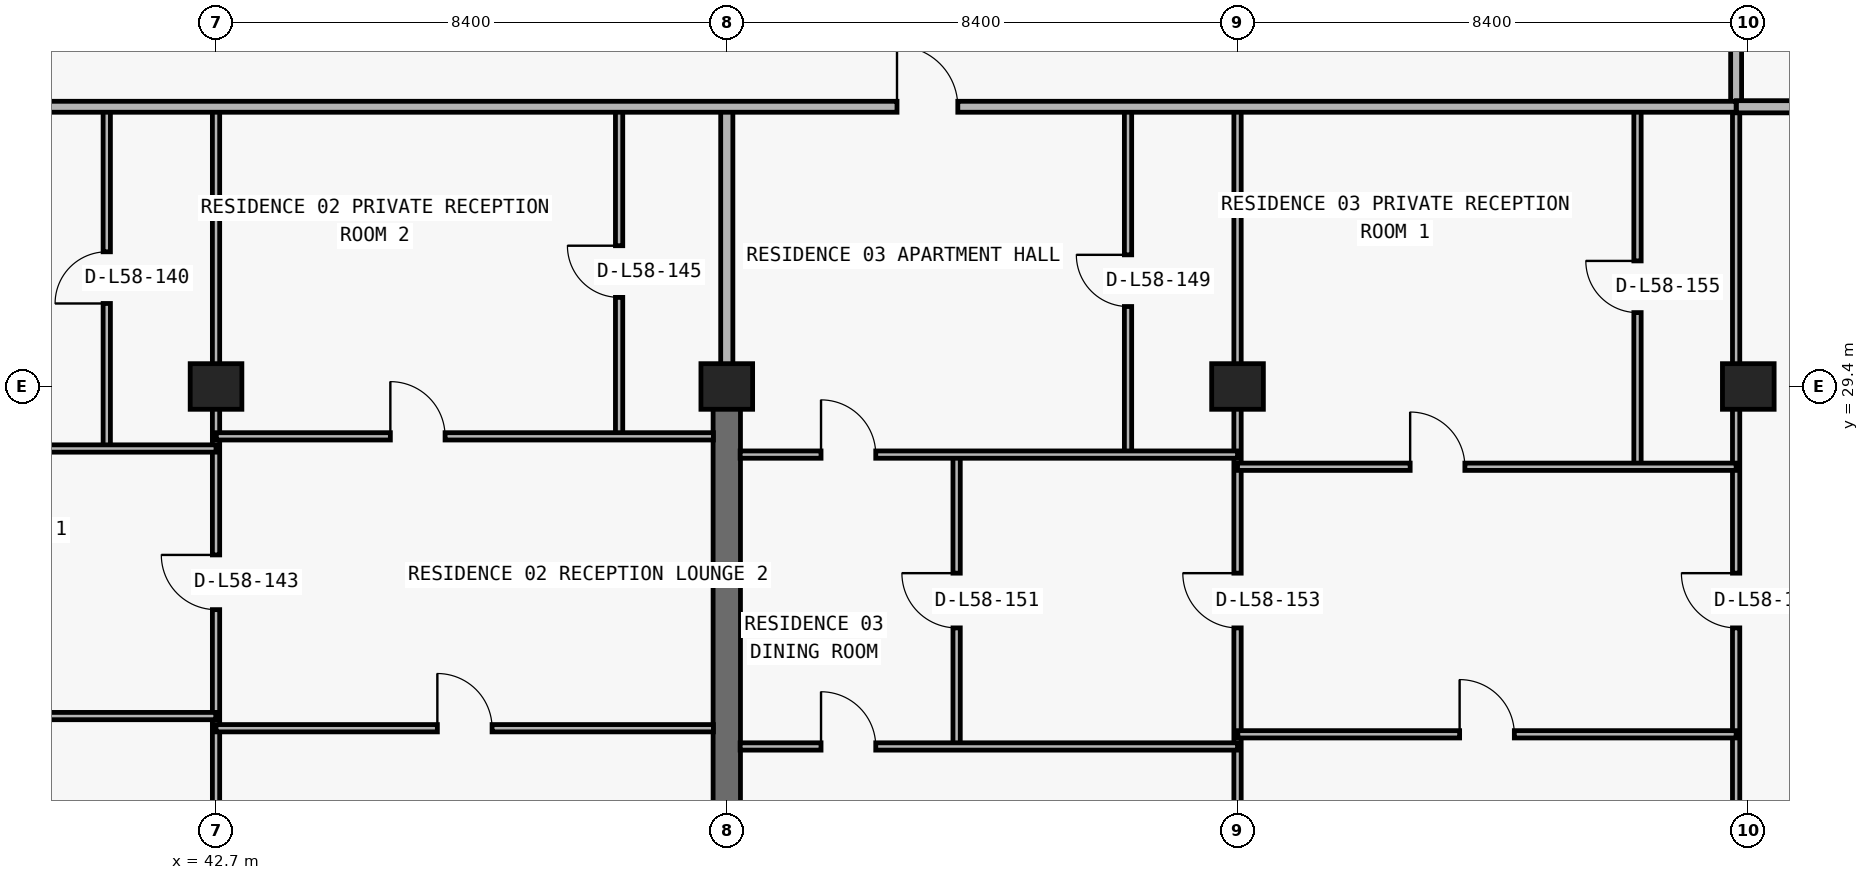
"""IFC4 building model, lengths in metres.
Left out: names, types, materials, properties, quantities, classifications, styles, units other than length and angle.
Written with IfcOpenShell. Run it as: python <this file> out.ifc"""

import sys

from ifc_helpers import new_model, si_unit, direction, frame, frame_2d, origin, origin_2d, place, context, subcontext, project, spatial, rectangle, extrude, element, fill, save


model = new_model("IFC4")
c1 = context("Model", 3, precision=1e-05, world=origin(), true_north=direction((0.0, 1.0)))
c2 = subcontext(c1, "Body", "Model", "MODEL_VIEW")
j1 = project(units=[si_unit("LENGTHUNIT", "METRE"), si_unit("PLANEANGLEUNIT", "RADIAN")], contexts=[c1])
p1 = place(None, origin())
s1 = spatial("IfcSite", under=j1, at=p1, CompositionType="ELEMENT")
p2 = place(p1, origin())
s2 = spatial("IfcBuilding", under=s1, at=p2, CompositionType="ELEMENT")
p3 = place(p2, frame((0.0, 0.0, 208.2)))
s3 = spatial("IfcBuildingStorey", under=s2, at=p3, CompositionType="ELEMENT", Elevation=208.2)
for number, where, z_axis, x_axis in (
    (1, (42.7, 29.4, 0.0), (0.0, 0.0, 1.0), (1.0, 0.0, 0.0)),
    (2, (51.1, 29.4, 0.0), (0.0, 0.0, 1.0), (1.0, 0.0, 0.0)),
    (3, (59.5, 29.4, 0.0), (0.0, 0.0, 1.0), (1.0, 0.0, 0.0)),
    (4, (67.9, 29.4, 0.0), (0.0, 0.0, 1.0), (1.0, 0.0, 0.0)),
):
    element("IfcColumn", number, at=place(p3, frame(where, z_axis=z_axis, x_axis=x_axis)), inside=s3, PredefinedType="COLUMN", context=c2, shape_type="SweptSolid", body=[
        extrude(rectangle(XDim=0.85, YDim=0.75, at=origin_2d()), origin(), (0.0, 0.0, 1.0), 3.05),
    ])
p4 = place(p3, frame((51.1, 20.8, 0.0), z_axis=(0.0, 0.0, 1.0), x_axis=(0.0, 1.0, 0.0)))
e5 = element("IfcWall", 5, at=p4, inside=s3, PredefinedType="SHEAR", context=c2, shape_type="SweptSolid", body=[
    extrude(rectangle(XDim=8.6, YDim=0.45, at=frame_2d((4.3, 0.0))), origin(), (0.0, 0.0, 1.0), 3.05),
])
p5 = place(p3, frame((40.903, 28.38, 0.0), z_axis=(0.0, 0.0, 1.0), x_axis=(0.0, 1.0, 0.0)))
e6 = element("IfcWall", 6, at=p5, inside=s3, PredefinedType="PARTITIONING", context=c2, shape_type="SweptSolid", body=[
    extrude(rectangle(XDim=5.62, YDim=0.12, at=frame_2d((2.81, 0.0))), origin(), (0.0, 0.0, 1.0), 3.05),
])
p6 = place(p5, frame((2.385, 0.0, 0.0)))
e7 = element("IfcOpeningElement", 7, at=p6, cuts=e6, PredefinedType="OPENING", context=c2, shape_type="SweptSolid", body=[
    extrude(rectangle(XDim=0.85, YDim=2.1, at=frame_2d((0.425, 1.05))), frame((0.0, 0.07, 0.0), z_axis=(0.0, -1.0, 0.0), x_axis=(1.0, 0.0, 0.0)), (0.0, 0.0, 1.0), 0.14),
])
p7 = place(p3, frame((42.7, 11.24, 0.0), z_axis=(0.0, 0.0, 1.0), x_axis=(0.0, 1.0, 0.0)))
e8 = element("IfcWall", 8, at=p7, inside=s3, PredefinedType="PARTITIONING", context=c2, shape_type="SweptSolid", body=[
    extrude(rectangle(XDim=22.76, YDim=0.12, at=frame_2d((11.38, 0.0))), origin(), (0.0, 0.0, 1.0), 2.263),
])
p8 = place(p7, frame((14.49, 0.0, 0.0)))
e9 = element("IfcOpeningElement", 9, at=p8, cuts=e8, PredefinedType="OPENING", context=c2, shape_type="SweptSolid", body=[
    extrude(rectangle(XDim=0.9, YDim=2.15, at=frame_2d((0.45, 1.075))), frame((0.0, 0.07, 0.0), z_axis=(0.0, -1.0, 0.0), x_axis=(1.0, 0.0, 0.0)), (0.0, 0.0, 1.0), 0.14),
])
p9 = place(p3, frame((49.329, 28.58, 0.0), z_axis=(0.0, 0.0, 1.0), x_axis=(0.0, 1.0, 0.0)))
e10 = element("IfcWall", 10, at=p9, inside=s3, PredefinedType="PARTITIONING", context=c2, shape_type="SweptSolid", body=[
    extrude(rectangle(XDim=5.42, YDim=0.12, at=frame_2d((2.71, 0.0))), origin(), (0.0, 0.0, 1.0), 3.05),
])
p10 = place(p9, frame((2.285, 0.0, 0.0)))
e11 = element("IfcOpeningElement", 11, at=p10, cuts=e10, PredefinedType="OPENING", context=c2, shape_type="SweptSolid", body=[
    extrude(rectangle(XDim=0.85, YDim=2.1, at=frame_2d((0.425, 1.05))), frame((0.0, 0.07, 0.0), z_axis=(0.0, -1.0, 0.0), x_axis=(1.0, 0.0, 0.0)), (0.0, 0.0, 1.0), 0.14),
])
p11 = place(p3, frame((51.1, 29.405, 0.0), z_axis=(0.0, 0.0, 1.0), x_axis=(0.0, 1.0, 0.0)))
e12 = element("IfcWall", 12, at=p11, inside=s3, PredefinedType="PARTITIONING", context=c2, shape_type="SweptSolid", body=[
    extrude(rectangle(XDim=4.595, YDim=0.2, at=frame_2d((2.297, 0.0))), origin(), (0.0, 0.0, 1.0), 2.335),
])
p12 = place(p3, frame((54.88, 23.48, 0.0), z_axis=(0.0, 0.0, 1.0), x_axis=(0.0, 1.0, 0.0)))
e13 = element("IfcWall", 13, at=p12, inside=s3, PredefinedType="PARTITIONING", context=c2, shape_type="SweptSolid", body=[
    extrude(rectangle(XDim=4.8, YDim=0.12, at=frame_2d((2.4, 0.0))), origin(), (0.0, 0.0, 1.0), 3.05),
])
p13 = place(p12, frame((1.95, 0.0, 0.0)))
e14 = element("IfcOpeningElement", 14, at=p13, cuts=e13, PredefinedType="OPENING", context=c2, shape_type="SweptSolid", body=[
    extrude(rectangle(XDim=0.9, YDim=2.15, at=frame_2d((0.45, 1.075))), frame((0.0, 0.07, 0.0), z_axis=(0.0, -1.0, 0.0), x_axis=(1.0, 0.0, 0.0)), (0.0, 0.0, 1.0), 0.14),
])
p14 = place(p3, frame((57.699, 28.28, 0.0), z_axis=(0.0, 0.0, 1.0), x_axis=(0.0, 1.0, 0.0)))
e15 = element("IfcWall", 15, at=p14, inside=s3, PredefinedType="PARTITIONING", context=c2, shape_type="SweptSolid", body=[
    extrude(rectangle(XDim=5.72, YDim=0.12, at=frame_2d((2.86, 0.0))), origin(), (0.0, 0.0, 1.0), 3.05),
])
p15 = place(p14, frame((2.435, 0.0, 0.0)))
e16 = element("IfcOpeningElement", 16, at=p15, cuts=e15, PredefinedType="OPENING", context=c2, shape_type="SweptSolid", body=[
    extrude(rectangle(XDim=0.85, YDim=2.1, at=frame_2d((0.425, 1.05))), frame((0.0, 0.07, 0.0), z_axis=(0.0, -1.0, 0.0), x_axis=(1.0, 0.0, 0.0)), (0.0, 0.0, 1.0), 0.14),
])
p16 = place(p3, frame((59.5, 11.24, 0.0), z_axis=(0.0, 0.0, 1.0), x_axis=(0.0, 1.0, 0.0)))
e17 = element("IfcWall", 17, at=p16, inside=s3, PredefinedType="PARTITIONING", context=c2, shape_type="SweptSolid", body=[
    extrude(rectangle(XDim=22.76, YDim=0.12, at=frame_2d((11.38, 0.0))), origin(), (0.0, 0.0, 1.0), 2.263),
])
p17 = place(p16, frame((14.19, 0.0, 0.0)))
e18 = element("IfcOpeningElement", 18, at=p17, cuts=e17, PredefinedType="OPENING", context=c2, shape_type="SweptSolid", body=[
    extrude(rectangle(XDim=0.9, YDim=2.15, at=frame_2d((0.45, 1.075))), frame((0.0, 0.07, 0.0), z_axis=(0.0, -1.0, 0.0), x_axis=(1.0, 0.0, 0.0)), (0.0, 0.0, 1.0), 0.14),
])
p18 = place(p3, frame((66.078, 28.08, 0.0), z_axis=(0.0, 0.0, 1.0), x_axis=(0.0, 1.0, 0.0)))
e19 = element("IfcWall", 19, at=p18, inside=s3, PredefinedType="PARTITIONING", context=c2, shape_type="SweptSolid", body=[
    extrude(rectangle(XDim=5.92, YDim=0.12, at=frame_2d((2.96, 0.0))), origin(), (0.0, 0.0, 1.0), 3.05),
])
p19 = place(p18, frame((2.535, 0.0, 0.0)))
e20 = element("IfcOpeningElement", 20, at=p19, cuts=e19, PredefinedType="OPENING", context=c2, shape_type="SweptSolid", body=[
    extrude(rectangle(XDim=0.85, YDim=2.1, at=frame_2d((0.425, 1.05))), frame((0.0, 0.07, 0.0), z_axis=(0.0, -1.0, 0.0), x_axis=(1.0, 0.0, 0.0)), (0.0, 0.0, 1.0), 0.14),
])
p20 = place(p3, frame((67.7, 11.32, 0.0), z_axis=(0.0, 0.0, 1.0), x_axis=(0.0, 1.0, 0.0)))
e21 = element("IfcWall", 21, at=p20, inside=s3, PredefinedType="PARTITIONING", context=c2, shape_type="SweptSolid", body=[
    extrude(rectangle(XDim=22.68, YDim=0.12, at=frame_2d((11.34, 0.0))), origin(), (0.0, 0.0, 1.0), 2.263),
])
p21 = place(p20, frame((14.11, 0.0, 0.0)))
e22 = element("IfcOpeningElement", 22, at=p21, cuts=e21, PredefinedType="OPENING", context=c2, shape_type="SweptSolid", body=[
    extrude(rectangle(XDim=0.9, YDim=2.15, at=frame_2d((0.45, 1.075))), frame((0.0, 0.07, 0.0), z_axis=(0.0, -1.0, 0.0), x_axis=(1.0, 0.0, 0.0)), (0.0, 0.0, 1.0), 0.14),
])
p22 = place(p3, frame((67.7, 34.005, 0.0), z_axis=(0.0, 0.0, 1.0), x_axis=(0.0, 1.0, 0.0)))
e23 = element("IfcWall", 23, at=p22, inside=s3, PredefinedType="PARTITIONING", context=c2, shape_type="SweptSolid", body=[
    extrude(rectangle(XDim=2.995, YDim=0.18, at=frame_2d((1.498, 0.0))), origin(), (0.0, 0.0, 1.0), 2.263),
])
p23 = place(p3, frame((51.32, 23.48, 0.0), z_axis=(0.0, 0.0, 1.0), x_axis=(1.0, 0.0, 0.0)))
e24 = element("IfcWall", 24, at=p23, inside=s3, PredefinedType="PARTITIONING", context=c2, shape_type="SweptSolid", body=[
    extrude(rectangle(XDim=8.18, YDim=0.12, at=frame_2d((4.09, 0.0))), origin(), (0.0, 0.0, 1.0), 3.05),
])
p24 = place(p23, frame((1.33, 0.0, 0.0)))
e25 = element("IfcOpeningElement", 25, at=p24, cuts=e24, PredefinedType="OPENING", context=c2, shape_type="SweptSolid", body=[
    extrude(rectangle(XDim=0.9, YDim=2.15, at=frame_2d((0.45, 1.075))), frame((0.0, 0.07, 0.0), z_axis=(0.0, -1.0, 0.0), x_axis=(1.0, 0.0, 0.0)), (0.0, 0.0, 1.0), 0.14),
])
p25 = place(p3, frame((59.505, 23.68, 0.0), z_axis=(0.0, 0.0, 1.0), x_axis=(1.0, 0.0, 0.0)))
e26 = element("IfcWall", 26, at=p25, inside=s3, PredefinedType="PARTITIONING", context=c2, shape_type="SweptSolid", body=[
    extrude(rectangle(XDim=8.195, YDim=0.12, at=frame_2d((4.098, 0.0))), origin(), (0.0, 0.0, 1.0), 3.05),
])
p26 = place(p25, frame((3.647, 0.0, 0.0)))
e27 = element("IfcOpeningElement", 27, at=p26, cuts=e26, PredefinedType="OPENING", context=c2, shape_type="SweptSolid", body=[
    extrude(rectangle(XDim=0.9, YDim=2.15, at=frame_2d((0.45, 1.075))), frame((0.0, 0.07, 0.0), z_axis=(0.0, -1.0, 0.0), x_axis=(1.0, 0.0, 0.0)), (0.0, 0.0, 1.0), 0.14),
])
p27 = place(p3, frame((42.7, 23.78, 0.0), z_axis=(0.0, 0.0, 1.0), x_axis=(1.0, 0.0, 0.0)))
e28 = element("IfcWall", 28, at=p27, inside=s3, PredefinedType="PARTITIONING", context=c2, shape_type="SweptSolid", body=[
    extrude(rectangle(XDim=8.18, YDim=0.12, at=frame_2d((4.09, 0.0))), origin(), (0.0, 0.0, 1.0), 3.05),
])
p28 = place(p27, frame((3.64, 0.0, 0.0)))
e29 = element("IfcOpeningElement", 29, at=p28, cuts=e28, PredefinedType="OPENING", context=c2, shape_type="SweptSolid", body=[
    extrude(rectangle(XDim=0.9, YDim=2.15, at=frame_2d((0.45, 1.075))), frame((0.0, 0.07, 0.0), z_axis=(0.0, -1.0, 0.0), x_axis=(1.0, 0.0, 0.0)), (0.0, 0.0, 1.0), 0.14),
])
p29 = place(p3, frame((35.105, 23.98, 0.0), z_axis=(0.0, 0.0, 1.0), x_axis=(1.0, 0.0, 0.0)))
e30 = element("IfcWall", 30, at=p29, inside=s3, PredefinedType="PARTITIONING", context=c2, shape_type="SweptSolid", body=[
    extrude(rectangle(XDim=7.59, YDim=0.12, at=frame_2d((3.795, 0.0))), origin(), (0.0, 0.0, 1.0), 3.05),
])
p30 = place(p29, frame((3.345, 0.0, 0.0)))
e31 = element("IfcOpeningElement", 31, at=p30, cuts=e30, PredefinedType="OPENING", context=c2, shape_type="SweptSolid", body=[
    extrude(rectangle(XDim=0.9, YDim=2.15, at=frame_2d((0.45, 1.075))), frame((0.0, 0.07, 0.0), z_axis=(0.0, -1.0, 0.0), x_axis=(1.0, 0.0, 0.0)), (0.0, 0.0, 1.0), 0.14),
])
p31 = place(p3, frame((59.5, 28.08, 0.0), z_axis=(0.0, 0.0, 1.0), x_axis=(1.0, 0.0, 0.0)))
e32 = element("IfcWall", 32, at=p31, inside=s3, PredefinedType="PARTITIONING", context=c2, shape_type="SweptSolid", body=[
    extrude(rectangle(XDim=8.2, YDim=0.12, at=frame_2d((4.1, 0.0))), origin(), (0.0, 0.0, 1.0), 3.05),
])
p32 = place(p31, frame((2.839, 0.0, 0.0)))
e33 = element("IfcOpeningElement", 33, at=p32, cuts=e32, PredefinedType="OPENING", context=c2, shape_type="SweptSolid", body=[
    extrude(rectangle(XDim=0.9, YDim=2.15, at=frame_2d((0.45, 1.075))), frame((0.0, 0.07, 0.0), z_axis=(0.0, -1.0, 0.0), x_axis=(1.0, 0.0, 0.0)), (0.0, 0.0, 1.0), 0.14),
])
p33 = place(p3, frame((51.32, 28.28, 0.0), z_axis=(0.0, 0.0, 1.0), x_axis=(1.0, 0.0, 0.0)))
e34 = element("IfcWall", 34, at=p33, inside=s3, PredefinedType="PARTITIONING", context=c2, shape_type="SweptSolid", body=[
    extrude(rectangle(XDim=8.18, YDim=0.12, at=frame_2d((4.09, 0.0))), origin(), (0.0, 0.0, 1.0), 3.05),
])
p34 = place(p33, frame((1.33, 0.0, 0.0)))
e35 = element("IfcOpeningElement", 35, at=p34, cuts=e34, PredefinedType="OPENING", context=c2, shape_type="SweptSolid", body=[
    extrude(rectangle(XDim=0.9, YDim=2.15, at=frame_2d((0.45, 1.075))), frame((0.0, 0.07, 0.0), z_axis=(0.0, -1.0, 0.0), x_axis=(1.0, 0.0, 0.0)), (0.0, 0.0, 1.0), 0.14),
])
p35 = place(p3, frame((35.1, 28.38, 0.0), z_axis=(0.0, 0.0, 1.0), x_axis=(1.0, 0.0, 0.0)))
e36 = element("IfcWall", 36, at=p35, inside=s3, PredefinedType="PARTITIONING", context=c2, shape_type="SweptSolid", body=[
    extrude(rectangle(XDim=7.6, YDim=0.12, at=frame_2d((3.8, 0.0))), origin(), (0.0, 0.0, 1.0), 3.05),
])
p36 = place(p35, frame((2.451, 0.0, 0.0)))
e37 = element("IfcOpeningElement", 37, at=p36, cuts=e36, PredefinedType="OPENING", context=c2, shape_type="SweptSolid", body=[
    extrude(rectangle(XDim=0.9, YDim=2.15, at=frame_2d((0.45, 1.075))), frame((0.0, 0.07, 0.0), z_axis=(0.0, -1.0, 0.0), x_axis=(1.0, 0.0, 0.0)), (0.0, 0.0, 1.0), 0.14),
])
p37 = place(p3, frame((42.705, 28.58, 0.0), z_axis=(0.0, 0.0, 1.0), x_axis=(1.0, 0.0, 0.0)))
e38 = element("IfcWall", 38, at=p37, inside=s3, PredefinedType="PARTITIONING", context=c2, shape_type="SweptSolid", body=[
    extrude(rectangle(XDim=8.175, YDim=0.12, at=frame_2d((4.087, 0.0))), origin(), (0.0, 0.0, 1.0), 3.05),
])
p38 = place(p37, frame((2.862, 0.0, 0.0)))
e39 = element("IfcOpeningElement", 39, at=p38, cuts=e38, PredefinedType="OPENING", context=c2, shape_type="SweptSolid", body=[
    extrude(rectangle(XDim=0.9, YDim=2.15, at=frame_2d((0.45, 1.075))), frame((0.0, 0.07, 0.0), z_axis=(0.0, -1.0, 0.0), x_axis=(1.0, 0.0, 0.0)), (0.0, 0.0, 1.0), 0.14),
])
p39 = place(p3, frame((26.7, 34.0, 0.0), z_axis=(0.0, 0.0, 1.0), x_axis=(1.0, 0.0, 0.0)))
e40 = element("IfcWall", 40, at=p39, inside=s3, PredefinedType="PARTITIONING", context=c2, shape_type="SweptSolid", body=[
    extrude(rectangle(XDim=41.0, YDim=0.18, at=frame_2d((20.5, 0.0))), origin(), (0.0, 0.0, 1.0), 3.05),
])
p40 = place(p39, frame((2.796, 0.0, 0.0)))
e41 = element("IfcOpeningElement", 41, at=p40, cuts=e40, PredefinedType="OPENING", context=c2, shape_type="SweptSolid", body=[
    extrude(rectangle(XDim=1.0, YDim=2.2, at=frame_2d((0.5, 1.1))), frame((0.0, 0.1, 0.0), z_axis=(0.0, -1.0, 0.0), x_axis=(1.0, 0.0, 0.0)), (0.0, 0.0, 1.0), 0.2),
])
p41 = place(p39, frame((27.199, 0.0, 0.0)))
e42 = element("IfcOpeningElement", 42, at=p41, cuts=e40, PredefinedType="OPENING", context=c2, shape_type="SweptSolid", body=[
    extrude(rectangle(XDim=1.0, YDim=2.2, at=frame_2d((0.5, 1.1))), frame((0.0, 0.1, 0.0), z_axis=(0.0, -1.0, 0.0), x_axis=(1.0, 0.0, 0.0)), (0.0, 0.0, 1.0), 0.2),
])
p42 = place(p3, frame((67.705, 34.0, 0.0), z_axis=(0.0, 0.0, 1.0), x_axis=(1.0, 0.0, 0.0)))
e43 = element("IfcWall", 43, at=p42, inside=s3, PredefinedType="PARTITIONING", context=c2, shape_type="SweptSolid", body=[
    extrude(rectangle(XDim=3.7, YDim=0.2, at=frame_2d((1.85, 0.0))), origin(), (0.0, 0.0, 1.0), 3.05),
])
p43 = place(p6, origin())
e44 = element("IfcDoor", 44, at=p43, inside=s3, OperationType="SINGLE_SWING_LEFT", PredefinedType="DOOR", context=c2, shape_type="SweptSolid", body=[
    extrude(rectangle(XDim=0.85, YDim=2.1, at=frame_2d((0.425, 1.05))), frame((0.0, 0.025, 0.0), z_axis=(0.0, -1.0, 0.0), x_axis=(1.0, 0.0, 0.0)), (0.0, 0.0, 1.0), 0.05),
])
fill(e7, e44)
p44 = place(p8, origin())
e45 = element("IfcDoor", 45, at=p44, inside=s3, OperationType="SINGLE_SWING_RIGHT", PredefinedType="DOOR", context=c2, shape_type="SweptSolid", body=[
    extrude(rectangle(XDim=0.9, YDim=2.15, at=frame_2d((0.45, 1.075))), frame((0.0, 0.025, 0.0), z_axis=(0.0, -1.0, 0.0), x_axis=(1.0, 0.0, 0.0)), (0.0, 0.0, 1.0), 0.05),
])
fill(e9, e45)
p45 = place(p38, origin())
e46 = element("IfcDoor", 46, at=p45, inside=s3, OperationType="SINGLE_SWING_LEFT", PredefinedType="DOOR", context=c2, shape_type="SweptSolid", body=[
    extrude(rectangle(XDim=0.9, YDim=2.15, at=frame_2d((0.45, 1.075))), frame((0.0, 0.025, 0.0), z_axis=(0.0, -1.0, 0.0), x_axis=(1.0, 0.0, 0.0)), (0.0, 0.0, 1.0), 0.05),
])
fill(e39, e46)
p46 = place(p10, origin())
e47 = element("IfcDoor", 47, at=p46, inside=s3, OperationType="SINGLE_SWING_RIGHT", PredefinedType="DOOR", context=c2, shape_type="SweptSolid", body=[
    extrude(rectangle(XDim=0.85, YDim=2.1, at=frame_2d((0.425, 1.05))), frame((0.0, 0.025, 0.0), z_axis=(0.0, -1.0, 0.0), x_axis=(1.0, 0.0, 0.0)), (0.0, 0.0, 1.0), 0.05),
])
fill(e11, e47)
p47 = place(p28, origin())
e48 = element("IfcDoor", 48, at=p47, inside=s3, OperationType="SINGLE_SWING_LEFT", PredefinedType="DOOR", context=c2, shape_type="SweptSolid", body=[
    extrude(rectangle(XDim=0.9, YDim=2.15, at=frame_2d((0.45, 1.075))), frame((0.0, 0.025, 0.0), z_axis=(0.0, -1.0, 0.0), x_axis=(1.0, 0.0, 0.0)), (0.0, 0.0, 1.0), 0.05),
])
fill(e29, e48)
p48 = place(p41, origin())
e49 = element("IfcDoor", 49, at=p48, inside=s3, OperationType="SINGLE_SWING_LEFT", PredefinedType="DOOR", context=c2, shape_type="SweptSolid", body=[
    extrude(rectangle(XDim=1.0, YDim=2.2, at=frame_2d((0.5, 1.1))), frame((0.0, 0.025, 0.0), z_axis=(0.0, -1.0, 0.0), x_axis=(1.0, 0.0, 0.0)), (0.0, 0.0, 1.0), 0.05),
])
fill(e42, e49)
p49 = place(p15, origin())
e50 = element("IfcDoor", 50, at=p49, inside=s3, OperationType="SINGLE_SWING_RIGHT", PredefinedType="DOOR", context=c2, shape_type="SweptSolid", body=[
    extrude(rectangle(XDim=0.85, YDim=2.1, at=frame_2d((0.425, 1.05))), frame((0.0, 0.025, 0.0), z_axis=(0.0, -1.0, 0.0), x_axis=(1.0, 0.0, 0.0)), (0.0, 0.0, 1.0), 0.05),
])
fill(e16, e50)
p50 = place(p34, origin())
e51 = element("IfcDoor", 51, at=p50, inside=s3, OperationType="SINGLE_SWING_LEFT", PredefinedType="DOOR", context=c2, shape_type="SweptSolid", body=[
    extrude(rectangle(XDim=0.9, YDim=2.15, at=frame_2d((0.45, 1.075))), frame((0.0, 0.025, 0.0), z_axis=(0.0, -1.0, 0.0), x_axis=(1.0, 0.0, 0.0)), (0.0, 0.0, 1.0), 0.05),
])
fill(e35, e51)
p51 = place(p13, origin())
e52 = element("IfcDoor", 52, at=p51, inside=s3, OperationType="SINGLE_SWING_RIGHT", PredefinedType="DOOR", context=c2, shape_type="SweptSolid", body=[
    extrude(rectangle(XDim=0.9, YDim=2.15, at=frame_2d((0.45, 1.075))), frame((0.0, 0.025, 0.0), z_axis=(0.0, -1.0, 0.0), x_axis=(1.0, 0.0, 0.0)), (0.0, 0.0, 1.0), 0.05),
])
fill(e14, e52)
p52 = place(p24, origin())
e53 = element("IfcDoor", 53, at=p52, inside=s3, OperationType="SINGLE_SWING_LEFT", PredefinedType="DOOR", context=c2, shape_type="SweptSolid", body=[
    extrude(rectangle(XDim=0.9, YDim=2.15, at=frame_2d((0.45, 1.075))), frame((0.0, 0.025, 0.0), z_axis=(0.0, -1.0, 0.0), x_axis=(1.0, 0.0, 0.0)), (0.0, 0.0, 1.0), 0.05),
])
fill(e25, e53)
p53 = place(p17, origin())
e54 = element("IfcDoor", 54, at=p53, inside=s3, OperationType="SINGLE_SWING_RIGHT", PredefinedType="DOOR", context=c2, shape_type="SweptSolid", body=[
    extrude(rectangle(XDim=0.9, YDim=2.15, at=frame_2d((0.45, 1.075))), frame((0.0, 0.025, 0.0), z_axis=(0.0, -1.0, 0.0), x_axis=(1.0, 0.0, 0.0)), (0.0, 0.0, 1.0), 0.05),
])
fill(e18, e54)
p54 = place(p32, origin())
e55 = element("IfcDoor", 55, at=p54, inside=s3, OperationType="SINGLE_SWING_LEFT", PredefinedType="DOOR", context=c2, shape_type="SweptSolid", body=[
    extrude(rectangle(XDim=0.9, YDim=2.15, at=frame_2d((0.45, 1.075))), frame((0.0, 0.025, 0.0), z_axis=(0.0, -1.0, 0.0), x_axis=(1.0, 0.0, 0.0)), (0.0, 0.0, 1.0), 0.05),
])
fill(e33, e55)
p55 = place(p19, origin())
e56 = element("IfcDoor", 56, at=p55, inside=s3, OperationType="SINGLE_SWING_RIGHT", PredefinedType="DOOR", context=c2, shape_type="SweptSolid", body=[
    extrude(rectangle(XDim=0.85, YDim=2.1, at=frame_2d((0.425, 1.05))), frame((0.0, 0.025, 0.0), z_axis=(0.0, -1.0, 0.0), x_axis=(1.0, 0.0, 0.0)), (0.0, 0.0, 1.0), 0.05),
])
fill(e20, e56)
p56 = place(p26, origin())
e57 = element("IfcDoor", 57, at=p56, inside=s3, OperationType="SINGLE_SWING_LEFT", PredefinedType="DOOR", context=c2, shape_type="SweptSolid", body=[
    extrude(rectangle(XDim=0.9, YDim=2.15, at=frame_2d((0.45, 1.075))), frame((0.0, 0.025, 0.0), z_axis=(0.0, -1.0, 0.0), x_axis=(1.0, 0.0, 0.0)), (0.0, 0.0, 1.0), 0.05),
])
fill(e27, e57)
p57 = place(p21, origin())
e58 = element("IfcDoor", 58, at=p57, inside=s3, OperationType="SINGLE_SWING_RIGHT", PredefinedType="DOOR", context=c2, shape_type="SweptSolid", body=[
    extrude(rectangle(XDim=0.9, YDim=2.15, at=frame_2d((0.45, 1.075))), frame((0.0, 0.025, 0.0), z_axis=(0.0, -1.0, 0.0), x_axis=(1.0, 0.0, 0.0)), (0.0, 0.0, 1.0), 0.05),
])
fill(e22, e58)
save(model, sys.argv[1])
